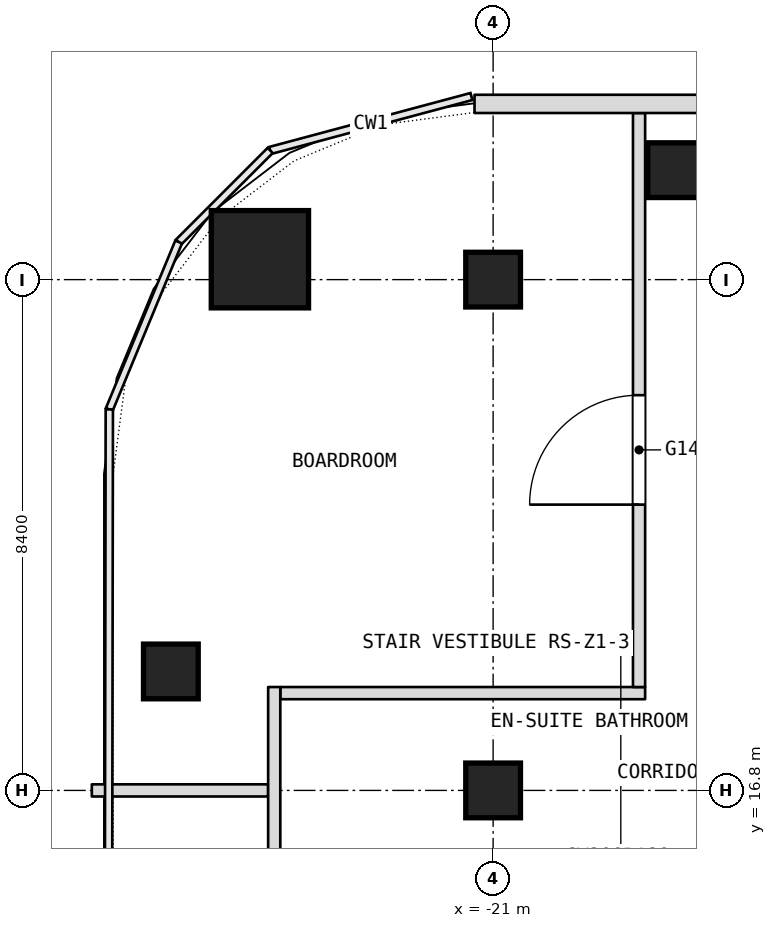
"""IFC4 building model, lengths in metres.
Left out: names, types, materials, properties, quantities, classifications, styles, units other than length and angle.
Written with IfcOpenShell. Run it as: python <this file> out.ifc"""

import sys

from ifc_helpers import new_model, si_unit, direction, frame, frame_2d, origin, origin_2d, place, context, subcontext, project, spatial, rectangle, extrude, element, fill, save


model = new_model("IFC4")
c1 = context("Model", 3, precision=1e-05, world=origin(), true_north=direction((0.0, 1.0)))
c2 = subcontext(c1, "Body", "Model", "MODEL_VIEW")
j1 = project(units=[si_unit("LENGTHUNIT", "METRE"), si_unit("PLANEANGLEUNIT", "RADIAN")], contexts=[c1])
p1 = place(None, origin())
s1 = spatial("IfcSite", under=j1, at=p1, CompositionType="ELEMENT")
p2 = place(p1, origin())
s2 = spatial("IfcBuilding", under=s1, at=p2, CompositionType="ELEMENT")
p3 = place(p2, frame((0.0, 0.0, 162.5)))
s3 = spatial("IfcBuildingStorey", under=s2, at=p3, CompositionType="ELEMENT", Elevation=162.5)
p4 = place(p3, frame((-24.835, 25.535, 0.0), z_axis=(0.0, 0.0, 1.0), x_axis=(1.0, 0.0, 0.0)))
e1 = element("IfcColumn", 1, at=p4, inside=s3, PredefinedType="COLUMN", context=c2, shape_type="SweptSolid", body=[
    extrude(rectangle(XDim=1.6, YDim=1.6, at=origin_2d()), origin(), (0.0, 0.0, 1.0), 3.6),
])
for number, where, z_axis, x_axis in (
    (2, (-21.0, 16.8, 0.0), (0.0, 0.0, 1.0), (1.0, 0.0, 0.0)),
    (3, (-21.0, 25.2, 0.0), (0.0, 0.0, 1.0), (1.0, 0.0, 0.0)),
    (4, (-26.3, 18.756, 0.0), (0.0, 0.0, 1.0), (1.0, 0.0, 0.0)),
    (5, (-18.007, 27.0, 0.0), (0.0, 0.0, 1.0), (1.0, 0.0, 0.0)),
):
    element("IfcColumn", number, at=place(p3, frame(where, z_axis=z_axis, x_axis=x_axis)), inside=s3, PredefinedType="COLUMN", context=c2, shape_type="SweptSolid", body=[
        extrude(rectangle(XDim=0.9, YDim=0.9, at=origin_2d()), origin(), (0.0, 0.0, 1.0), 3.6),
    ])
p5 = place(p3, frame((-27.6, 16.8, 0.0), z_axis=(0.0, 0.0, 1.0), x_axis=(1.0, 0.0, 0.0)))
e6 = element("IfcWall", 6, at=p5, inside=s3, PredefinedType="PARTITIONING", context=c2, shape_type="SweptSolid", body=[
    extrude(rectangle(XDim=2.9, YDim=0.2, at=frame_2d((1.45, 0.0))), origin(), (0.0, 0.0, 1.0), 2.89),
])
p6 = place(p3, frame((-24.5, 18.4, 0.0), z_axis=(0.0, 0.0, 1.0), x_axis=(1.0, 0.0, 0.0)))
e7 = element("IfcWall", 7, at=p6, inside=s3, PredefinedType="PARTITIONING", context=c2, shape_type="SweptSolid", body=[
    extrude(rectangle(XDim=6.0, YDim=0.2, at=frame_2d((3.0, 0.0))), origin(), (0.0, 0.0, 1.0), 3.34),
])
p7 = place(p3, frame((-18.6, 18.5, 0.0), z_axis=(0.0, 0.0, 1.0), x_axis=(0.0, 1.0, 0.0)))
e8 = element("IfcWall", 8, at=p7, inside=s3, PredefinedType="PARTITIONING", context=c2, shape_type="SweptSolid", body=[
    extrude(rectangle(XDim=9.44, YDim=0.2, at=frame_2d((4.72, 0.0))), origin(), (0.0, 0.0, 1.0), 3.34),
])
p8 = place(p7, frame((3.0, 0.0, 0.0)))
e9 = element("IfcOpeningElement", 9, at=p8, cuts=e8, PredefinedType="OPENING", context=c2, shape_type="SweptSolid", body=[
    extrude(rectangle(XDim=1.8, YDim=2.1, at=frame_2d((0.9, 1.05))), frame((0.0, 0.1, 0.0), z_axis=(0.0, -1.0, 0.0), x_axis=(1.0, 0.0, 0.0)), (0.0, 0.0, 1.0), 0.2),
])
p9 = place(p3, frame((-24.6, 6.9, 0.0), z_axis=(0.0, 0.0, 1.0), x_axis=(0.0, 1.0, 0.0)))
e10 = element("IfcWall", 10, at=p9, inside=s3, PredefinedType="PARTITIONING", context=c2, shape_type="SweptSolid", body=[
    extrude(rectangle(XDim=11.6, YDim=0.2, at=frame_2d((5.8, 0.0))), origin(), (0.0, 0.0, 1.0), 3.34),
])
p10 = place(p9, frame((5.45, 0.0, 0.0)))
e11 = element("IfcOpeningElement", 11, at=p10, cuts=e10, PredefinedType="OPENING", context=c2, shape_type="SweptSolid", body=[
    extrude(rectangle(XDim=1.8, YDim=2.1, at=frame_2d((0.9, 1.05))), frame((0.0, 0.1, 0.0), z_axis=(0.0, -1.0, 0.0), x_axis=(1.0, 0.0, 0.0)), (0.0, 0.0, 1.0), 0.2),
])
p11 = place(p3, frame((21.306, 28.09, 0.0), z_axis=(0.0, 0.0, 1.0), x_axis=(-1.0, 0.0, 0.0)))
e12 = element("IfcWall", 12, at=p11, inside=s3, PredefinedType="NOTDEFINED", context=c2, shape_type="SweptSolid", body=[
    extrude(rectangle(XDim=42.612, YDim=0.3, at=frame_2d((21.306, 0.0))), origin(), (0.0, 0.0, 1.0), 3.6),
])
p12 = place(p11, frame((5.406, 0.0, 0.9)))
e13 = element("IfcOpeningElement", 13, at=p12, cuts=e12, PredefinedType="OPENING", context=c2, shape_type="SweptSolid", body=[
    extrude(rectangle(XDim=2.4, YDim=2.1, at=frame_2d((1.2, 1.05))), frame((0.0, 0.15, 0.0), z_axis=(0.0, -1.0, 0.0), x_axis=(1.0, 0.0, 0.0)), (0.0, 0.0, 1.0), 0.3),
])
p13 = place(p11, frame((9.606, 0.0, 0.9)))
e14 = element("IfcOpeningElement", 14, at=p13, cuts=e12, PredefinedType="OPENING", context=c2, shape_type="SweptSolid", body=[
    extrude(rectangle(XDim=2.4, YDim=2.1, at=frame_2d((1.2, 1.05))), frame((0.0, 0.15, 0.0), z_axis=(0.0, -1.0, 0.0), x_axis=(1.0, 0.0, 0.0)), (0.0, 0.0, 1.0), 0.3),
])
p14 = place(p11, frame((13.806, 0.0, 0.9)))
e15 = element("IfcOpeningElement", 15, at=p14, cuts=e12, PredefinedType="OPENING", context=c2, shape_type="SweptSolid", body=[
    extrude(rectangle(XDim=2.4, YDim=2.1, at=frame_2d((1.2, 1.05))), frame((0.0, 0.15, 0.0), z_axis=(0.0, -1.0, 0.0), x_axis=(1.0, 0.0, 0.0)), (0.0, 0.0, 1.0), 0.3),
])
p15 = place(p11, frame((18.006, 0.0, 0.9)))
e16 = element("IfcOpeningElement", 16, at=p15, cuts=e12, PredefinedType="OPENING", context=c2, shape_type="SweptSolid", body=[
    extrude(rectangle(XDim=2.4, YDim=2.1, at=frame_2d((1.2, 1.05))), frame((0.0, 0.15, 0.0), z_axis=(0.0, -1.0, 0.0), x_axis=(1.0, 0.0, 0.0)), (0.0, 0.0, 1.0), 0.3),
])
p16 = place(p11, frame((22.206, 0.0, 0.9)))
e17 = element("IfcOpeningElement", 17, at=p16, cuts=e12, PredefinedType="OPENING", context=c2, shape_type="SweptSolid", body=[
    extrude(rectangle(XDim=2.4, YDim=2.1, at=frame_2d((1.2, 1.05))), frame((0.0, 0.15, 0.0), z_axis=(0.0, -1.0, 0.0), x_axis=(1.0, 0.0, 0.0)), (0.0, 0.0, 1.0), 0.3),
])
p17 = place(p11, frame((26.406, 0.0, 0.9)))
e18 = element("IfcOpeningElement", 18, at=p17, cuts=e12, PredefinedType="OPENING", context=c2, shape_type="SweptSolid", body=[
    extrude(rectangle(XDim=2.4, YDim=2.1, at=frame_2d((1.2, 1.05))), frame((0.0, 0.15, 0.0), z_axis=(0.0, -1.0, 0.0), x_axis=(1.0, 0.0, 0.0)), (0.0, 0.0, 1.0), 0.3),
])
p18 = place(p11, frame((30.606, 0.0, 0.9)))
e19 = element("IfcOpeningElement", 19, at=p18, cuts=e12, PredefinedType="OPENING", context=c2, shape_type="SweptSolid", body=[
    extrude(rectangle(XDim=2.4, YDim=2.1, at=frame_2d((1.2, 1.05))), frame((0.0, 0.15, 0.0), z_axis=(0.0, -1.0, 0.0), x_axis=(1.0, 0.0, 0.0)), (0.0, 0.0, 1.0), 0.3),
])
p19 = place(p11, frame((34.806, 0.0, 0.9)))
e20 = element("IfcOpeningElement", 20, at=p19, cuts=e12, PredefinedType="OPENING", context=c2, shape_type="SweptSolid", body=[
    extrude(rectangle(XDim=2.4, YDim=2.1, at=frame_2d((1.2, 1.05))), frame((0.0, 0.15, 0.0), z_axis=(0.0, -1.0, 0.0), x_axis=(1.0, 0.0, 0.0)), (0.0, 0.0, 1.0), 0.3),
])
p20 = place(p8, origin())
e21 = element("IfcDoor", 21, at=p20, inside=s3, OperationType="DOUBLE_DOOR_SINGLE_SWING", PredefinedType="DOOR", context=c2, shape_type="SweptSolid", body=[
    extrude(rectangle(XDim=1.8, YDim=2.1, at=frame_2d((0.9, 1.05))), frame((0.0, 0.025, 0.0), z_axis=(0.0, -1.0, 0.0), x_axis=(1.0, 0.0, 0.0)), (0.0, 0.0, 1.0), 0.05),
])
fill(e9, e21)
save(model, sys.argv[1])
